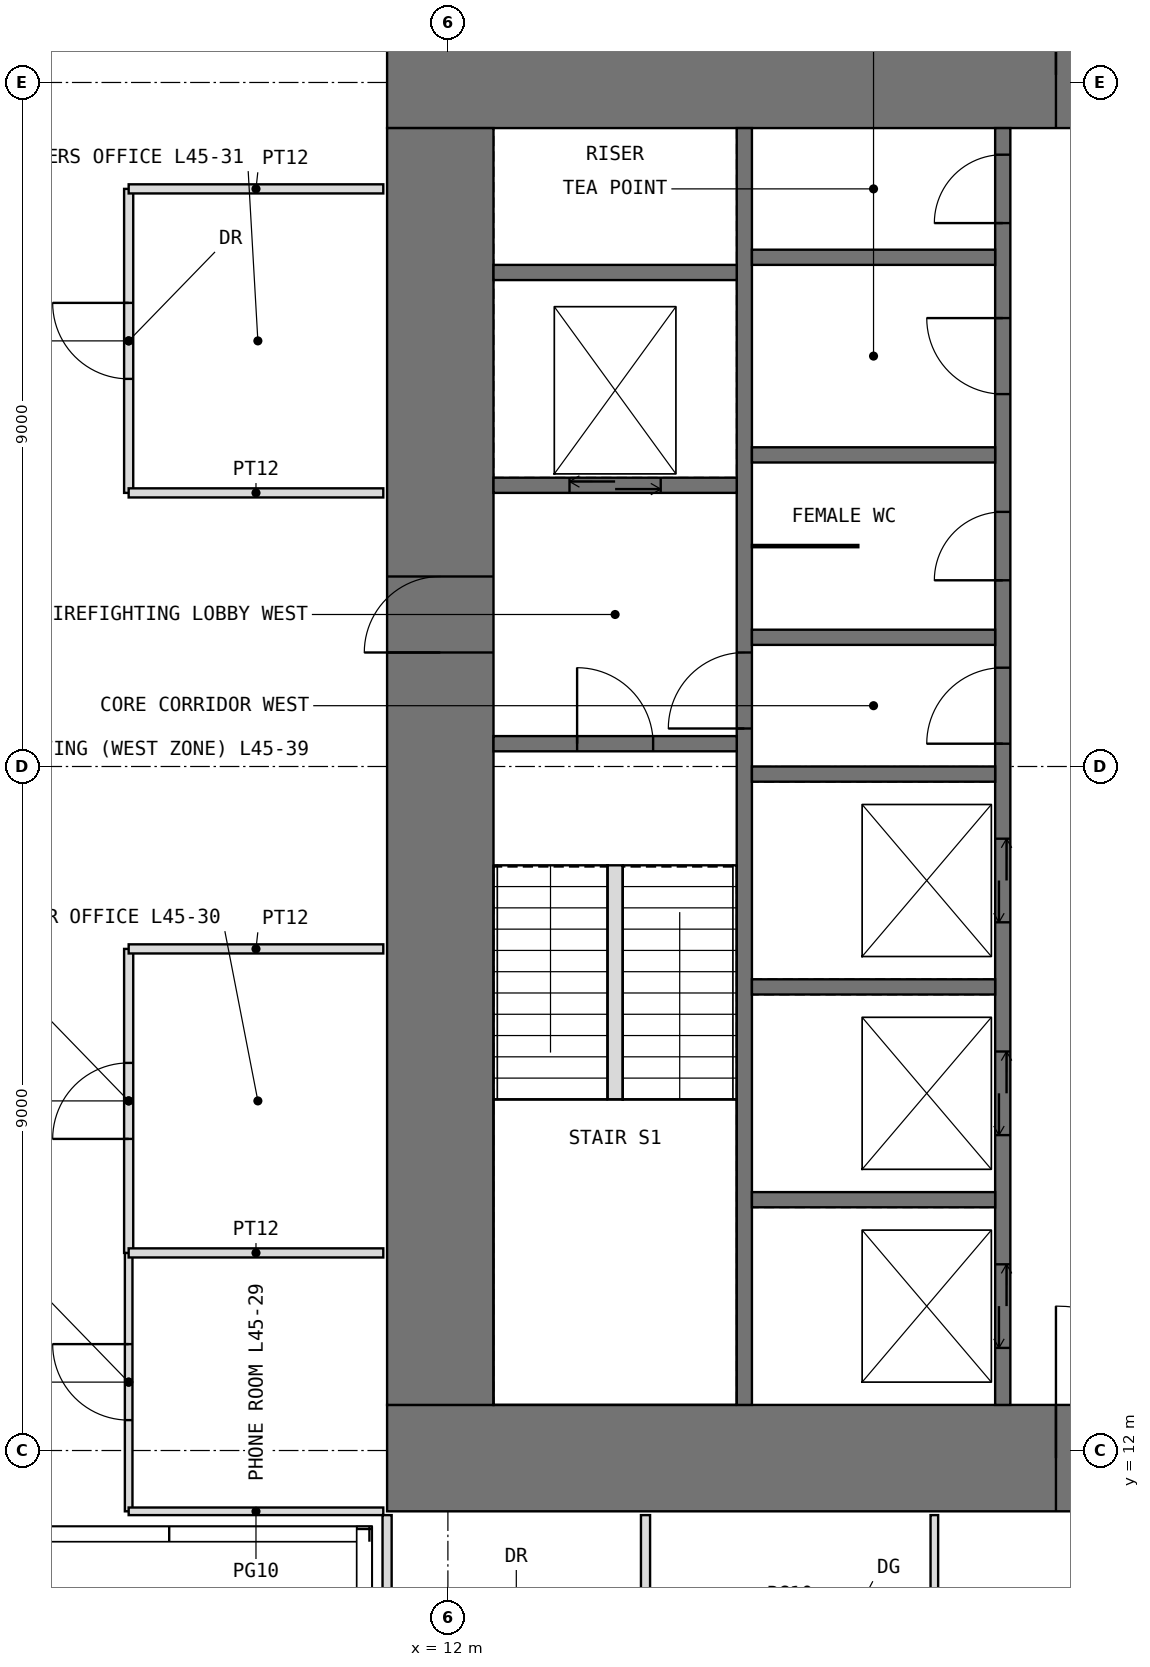
"""IFC4 building model, lengths in metres.
Left out: names, types, materials, properties, quantities, classifications, styles, units other than length and angle.
Written with IfcOpenShell. Run it as: python <this file> out.ifc"""

import sys

from ifc_helpers import new_model, si_unit, direction, frame, frame_2d, origin, place, context, subcontext, project, spatial, rectangle, extrude, element, fill, save


model = new_model("IFC4")
c1 = context("Model", 3, precision=1e-05, world=origin(), true_north=direction((0.0, 1.0)))
c2 = subcontext(c1, "Body", "Model", "MODEL_VIEW")
j1 = project(units=[si_unit("LENGTHUNIT", "METRE"), si_unit("PLANEANGLEUNIT", "RADIAN")], contexts=[c1])
p1 = place(None, origin())
s1 = spatial("IfcSite", under=j1, at=p1, CompositionType="ELEMENT")
p2 = place(p1, origin())
s2 = spatial("IfcBuilding", under=s1, at=p2, CompositionType="ELEMENT")
p3 = place(p2, frame((0.0, 0.0, 190.5)))
s3 = spatial("IfcBuildingStorey", under=s2, at=p3, CompositionType="ELEMENT", Elevation=190.5)
p4 = place(p3, frame((11.2, 11.9, -0.05), z_axis=(0.0, 0.0, 1.0), x_axis=(1.0, 0.0, 0.0)))
e1 = element("IfcWall", 1, at=p4, inside=s3, PredefinedType="SHEAR", context=c2, shape_type="SweptSolid", body=[
    extrude(rectangle(XDim=19.6, YDim=1.4, at=frame_2d((9.8, 0.0))), origin(), (0.0, 0.0, 1.0), 4.0),
])
p5 = place(p4, frame((8.8, 0.0, 0.05)))
e2 = element("IfcOpeningElement", 2, at=p5, cuts=e1, PredefinedType="OPENING", context=c2, shape_type="SweptSolid", body=[
    extrude(rectangle(XDim=2.0, YDim=2.2, at=frame_2d((1.0, 1.1))), frame((0.0, 0.71, 0.0), z_axis=(0.0, -1.0, 0.0), x_axis=(1.0, 0.0, 0.0)), (0.0, 0.0, 1.0), 1.42),
])
p6 = place(p3, frame((11.2, 30.1, -0.05), z_axis=(0.0, 0.0, 1.0), x_axis=(1.0, 0.0, 0.0)))
e3 = element("IfcWall", 3, at=p6, inside=s3, PredefinedType="SHEAR", context=c2, shape_type="SweptSolid", body=[
    extrude(rectangle(XDim=19.6, YDim=1.4, at=frame_2d((9.8, 0.0))), origin(), (0.0, 0.0, 1.0), 4.0),
])
p7 = place(p6, frame((8.8, 0.0, 0.05)))
e4 = element("IfcOpeningElement", 4, at=p7, cuts=e3, PredefinedType="OPENING", context=c2, shape_type="SweptSolid", body=[
    extrude(rectangle(XDim=2.0, YDim=2.2, at=frame_2d((1.0, 1.1))), frame((0.0, 0.71, 0.0), z_axis=(0.0, -1.0, 0.0), x_axis=(1.0, 0.0, 0.0)), (0.0, 0.0, 1.0), 1.42),
])
p8 = place(p3, frame((11.9, 12.6, -0.05), z_axis=(0.0, 0.0, 1.0), x_axis=(0.0, 1.0, 0.0)))
e5 = element("IfcWall", 5, at=p8, inside=s3, PredefinedType="SHEAR", context=c2, shape_type="SweptSolid", body=[
    extrude(rectangle(XDim=16.8, YDim=1.4, at=frame_2d((8.4, 0.0))), origin(), (0.0, 0.0, 1.0), 4.0),
])
p9 = place(p8, frame((9.9, 0.0, 0.05)))
e6 = element("IfcOpeningElement", 6, at=p9, cuts=e5, PredefinedType="OPENING", context=c2, shape_type="SweptSolid", body=[
    extrude(rectangle(XDim=1.0, YDim=2.2, at=frame_2d((0.5, 1.1))), frame((0.0, 0.71, 0.0), z_axis=(0.0, -1.0, 0.0), x_axis=(1.0, 0.0, 0.0)), (0.0, 0.0, 1.0), 1.42),
])
p10 = place(p3, frame((15.9, 12.6, -0.05), z_axis=(0.0, 0.0, 1.0), x_axis=(0.0, 1.0, 0.0)))
e7 = element("IfcWall", 7, at=p10, inside=s3, PredefinedType="SHEAR", context=c2, shape_type="SweptSolid", body=[
    extrude(rectangle(XDim=16.8, YDim=0.2, at=frame_2d((8.4, 0.0))), origin(), (0.0, 0.0, 1.0), 4.0),
])
p11 = place(p10, frame((8.9, 0.0, 0.05)))
e8 = element("IfcOpeningElement", 8, at=p11, cuts=e7, PredefinedType="OPENING", context=c2, shape_type="SweptSolid", body=[
    extrude(rectangle(XDim=1.0, YDim=2.2, at=frame_2d((0.5, 1.1))), frame((0.0, 0.11, 0.0), z_axis=(0.0, -1.0, 0.0), x_axis=(1.0, 0.0, 0.0)), (0.0, 0.0, 1.0), 0.22),
])
p12 = place(p3, frame((19.3, 12.6, -0.05), z_axis=(0.0, 0.0, 1.0), x_axis=(0.0, 1.0, 0.0)))
e9 = element("IfcWall", 9, at=p12, inside=s3, PredefinedType="SHEAR", context=c2, shape_type="SweptSolid", body=[
    extrude(rectangle(XDim=16.8, YDim=0.2, at=frame_2d((8.4, 0.0))), origin(), (0.0, 0.0, 1.0), 4.0),
])
p13 = place(p12, frame((8.7, 0.0, 0.05)))
e10 = element("IfcOpeningElement", 10, at=p13, cuts=e9, PredefinedType="OPENING", context=c2, shape_type="SweptSolid", body=[
    extrude(rectangle(XDim=1.0, YDim=2.2, at=frame_2d((0.5, 1.1))), frame((0.0, 0.11, 0.0), z_axis=(0.0, -1.0, 0.0), x_axis=(1.0, 0.0, 0.0)), (0.0, 0.0, 1.0), 0.22),
])
p14 = place(p12, frame((10.85, 0.0, 0.05)))
e11 = element("IfcOpeningElement", 11, at=p14, cuts=e9, PredefinedType="OPENING", context=c2, shape_type="SweptSolid", body=[
    extrude(rectangle(XDim=0.9, YDim=2.2, at=frame_2d((0.45, 1.1))), frame((0.0, 0.11, 0.0), z_axis=(0.0, -1.0, 0.0), x_axis=(1.0, 0.0, 0.0)), (0.0, 0.0, 1.0), 0.22),
])
p15 = place(p12, frame((13.3, 0.0, 0.05)))
e12 = element("IfcOpeningElement", 12, at=p15, cuts=e9, PredefinedType="OPENING", context=c2, shape_type="SweptSolid", body=[
    extrude(rectangle(XDim=1.0, YDim=2.2, at=frame_2d((0.5, 1.1))), frame((0.0, 0.11, 0.0), z_axis=(0.0, -1.0, 0.0), x_axis=(1.0, 0.0, 0.0)), (0.0, 0.0, 1.0), 0.22),
])
p16 = place(p12, frame((15.55, 0.0, 0.05)))
e13 = element("IfcOpeningElement", 13, at=p16, cuts=e9, PredefinedType="OPENING", context=c2, shape_type="SweptSolid", body=[
    extrude(rectangle(XDim=0.9, YDim=2.2, at=frame_2d((0.45, 1.1))), frame((0.0, 0.11, 0.0), z_axis=(0.0, -1.0, 0.0), x_axis=(1.0, 0.0, 0.0)), (0.0, 0.0, 1.0), 0.22),
])
p17 = place(p12, frame((0.75, 0.0, 0.05)))
e14 = element("IfcOpeningElement", 14, at=p17, cuts=e9, PredefinedType="OPENING", context=c2, shape_type="SweptSolid", body=[
    extrude(rectangle(XDim=1.1, YDim=2.2, at=frame_2d((0.55, 1.1))), frame((0.0, 0.11, 0.0), z_axis=(0.0, -1.0, 0.0), x_axis=(1.0, 0.0, 0.0)), (0.0, 0.0, 1.0), 0.22),
])
p18 = place(p12, frame((3.55, 0.0, 0.05)))
e15 = element("IfcOpeningElement", 15, at=p18, cuts=e9, PredefinedType="OPENING", context=c2, shape_type="SweptSolid", body=[
    extrude(rectangle(XDim=1.1, YDim=2.2, at=frame_2d((0.55, 1.1))), frame((0.0, 0.11, 0.0), z_axis=(0.0, -1.0, 0.0), x_axis=(1.0, 0.0, 0.0)), (0.0, 0.0, 1.0), 0.22),
])
p19 = place(p12, frame((6.35, 0.0, 0.05)))
e16 = element("IfcOpeningElement", 16, at=p19, cuts=e9, PredefinedType="OPENING", context=c2, shape_type="SweptSolid", body=[
    extrude(rectangle(XDim=1.1, YDim=2.2, at=frame_2d((0.55, 1.1))), frame((0.0, 0.11, 0.0), z_axis=(0.0, -1.0, 0.0), x_axis=(1.0, 0.0, 0.0)), (0.0, 0.0, 1.0), 0.22),
])
p20 = place(p3, frame((12.6, 21.3, -0.05), z_axis=(0.0, 0.0, 1.0), x_axis=(1.0, 0.0, 0.0)))
e17 = element("IfcWall", 17, at=p20, inside=s3, PredefinedType="SHEAR", context=c2, shape_type="SweptSolid", body=[
    extrude(rectangle(XDim=3.2, YDim=0.2, at=frame_2d((1.6, 0.0))), origin(), (0.0, 0.0, 1.0), 4.0),
])
p21 = place(p20, frame((1.1, 0.0, 0.05)))
e18 = element("IfcOpeningElement", 18, at=p21, cuts=e17, PredefinedType="OPENING", context=c2, shape_type="SweptSolid", body=[
    extrude(rectangle(XDim=1.0, YDim=2.2, at=frame_2d((0.5, 1.1))), frame((0.0, 0.11, 0.0), z_axis=(0.0, -1.0, 0.0), x_axis=(1.0, 0.0, 0.0)), (0.0, 0.0, 1.0), 0.22),
])
p22 = place(p3, frame((12.6, 24.7, -0.05), z_axis=(0.0, 0.0, 1.0), x_axis=(1.0, 0.0, 0.0)))
e19 = element("IfcWall", 19, at=p22, inside=s3, PredefinedType="SHEAR", context=c2, shape_type="SweptSolid", body=[
    extrude(rectangle(XDim=3.2, YDim=0.2, at=frame_2d((1.6, 0.0))), origin(), (0.0, 0.0, 1.0), 4.0),
])
p23 = place(p22, frame((1.0, 0.0, 0.05)))
e20 = element("IfcOpeningElement", 20, at=p23, cuts=e19, PredefinedType="OPENING", context=c2, shape_type="SweptSolid", body=[
    extrude(rectangle(XDim=1.2, YDim=2.2, at=frame_2d((0.6, 1.1))), frame((0.0, 0.11, 0.0), z_axis=(0.0, -1.0, 0.0), x_axis=(1.0, 0.0, 0.0)), (0.0, 0.0, 1.0), 0.22),
])
for number, where, z_axis, x_axis in (
    (21, (12.6, 27.5, -0.05), (0.0, 0.0, 1.0), (1.0, 0.0, 0.0)),
    (22, (16.0, 15.3, -0.05), (0.0, 0.0, 1.0), (1.0, 0.0, 0.0)),
    (23, (16.0, 18.1, -0.05), (0.0, 0.0, 1.0), (1.0, 0.0, 0.0)),
    (24, (16.0, 20.9, -0.05), (0.0, 0.0, 1.0), (1.0, 0.0, 0.0)),
    (25, (16.0, 22.7, -0.05), (0.0, 0.0, 1.0), (1.0, 0.0, 0.0)),
    (26, (16.0, 25.1, -0.05), (0.0, 0.0, 1.0), (1.0, 0.0, 0.0)),
    (27, (16.0, 27.7, -0.05), (0.0, 0.0, 1.0), (1.0, 0.0, 0.0)),
):
    element("IfcWall", number, at=place(p3, frame(where, z_axis=z_axis, x_axis=x_axis)), inside=s3, PredefinedType="SHEAR", context=c2, shape_type="SweptSolid", body=[
        extrude(rectangle(XDim=3.2, YDim=0.2, at=frame_2d((1.6, 0.0))), origin(), (0.0, 0.0, 1.0), 4.0),
    ])
p24 = place(p3, frame((16.0, 23.9, 0.0), z_axis=(0.0, 0.0, 1.0), x_axis=(1.0, 0.0, 0.0)))
e28 = element("IfcWall", 28, at=p24, inside=s3, PredefinedType="PARTITIONING", context=c2, shape_type="SweptSolid", body=[
    extrude(rectangle(XDim=1.4, YDim=0.03, at=frame_2d((0.7, 0.0))), origin(), (0.0, 0.0, 1.0), 3.75),
])
p25 = place(p3, frame((7.8, 11.2, 0.0), z_axis=(0.0, 0.0, 1.0), x_axis=(0.0, 1.0, 0.0)))
e29 = element("IfcWall", 29, at=p25, inside=s3, PredefinedType="PARTITIONING", context=c2, shape_type="SweptSolid", body=[
    extrude(rectangle(XDim=3.4, YDim=0.1, at=frame_2d((1.7, 0.0))), origin(), (0.0, 0.0, 1.0), 3.75),
])
p26 = place(p25, frame((1.2, 0.0, 0.0)))
e30 = element("IfcOpeningElement", 30, at=p26, cuts=e29, PredefinedType="OPENING", context=c2, shape_type="SweptSolid", body=[
    extrude(rectangle(XDim=1.0, YDim=2.4, at=frame_2d((0.5, 1.2))), frame((0.0, 0.06, 0.0), z_axis=(0.0, -1.0, 0.0), x_axis=(1.0, 0.0, 0.0)), (0.0, 0.0, 1.0), 0.12),
])
p27 = place(p3, frame((7.8, 11.2, 0.0), z_axis=(0.0, 0.0, 1.0), x_axis=(1.0, 0.0, 0.0)))
e31 = element("IfcWall", 31, at=p27, inside=s3, PredefinedType="PARTITIONING", context=c2, shape_type="SweptSolid", body=[
    extrude(rectangle(XDim=3.35, YDim=0.1, at=frame_2d((1.675, 0.0))), origin(), (0.0, 0.0, 1.0), 3.75),
])
p28 = place(p3, frame((7.8, 14.6, 0.0), z_axis=(0.0, 0.0, 1.0), x_axis=(0.0, 1.0, 0.0)))
e32 = element("IfcWall", 32, at=p28, inside=s3, PredefinedType="PARTITIONING", context=c2, shape_type="SweptSolid", body=[
    extrude(rectangle(XDim=4.0, YDim=0.12, at=frame_2d((2.0, 0.0))), origin(), (0.0, 0.0, 1.0), 3.75),
])
p29 = place(p28, frame((1.5, 0.0, 0.0)))
e33 = element("IfcOpeningElement", 33, at=p29, cuts=e32, PredefinedType="OPENING", context=c2, shape_type="SweptSolid", body=[
    extrude(rectangle(XDim=1.0, YDim=2.2, at=frame_2d((0.5, 1.1))), frame((0.0, 0.07, 0.0), z_axis=(0.0, -1.0, 0.0), x_axis=(1.0, 0.0, 0.0)), (0.0, 0.0, 1.0), 0.14),
])
for number, where, z_axis, x_axis in (
    (34, (7.8, 14.6, 0.0), (0.0, 0.0, 1.0), (1.0, 0.0, 0.0)),
    (35, (7.8, 18.6, 0.0), (0.0, 0.0, 1.0), (1.0, 0.0, 0.0)),
):
    element("IfcWall", number, at=place(p3, frame(where, z_axis=z_axis, x_axis=x_axis)), inside=s3, PredefinedType="PARTITIONING", context=c2, shape_type="SweptSolid", body=[
        extrude(rectangle(XDim=3.35, YDim=0.12, at=frame_2d((1.675, 0.0))), origin(), (0.0, 0.0, 1.0), 3.75),
    ])
p30 = place(p3, frame((7.8, 24.6, 0.0), z_axis=(0.0, 0.0, 1.0), x_axis=(0.0, 1.0, 0.0)))
e36 = element("IfcWall", 36, at=p30, inside=s3, PredefinedType="PARTITIONING", context=c2, shape_type="SweptSolid", body=[
    extrude(rectangle(XDim=4.0, YDim=0.12, at=frame_2d((2.0, 0.0))), origin(), (0.0, 0.0, 1.0), 3.75),
])
p31 = place(p30, frame((1.5, 0.0, 0.0)))
e37 = element("IfcOpeningElement", 37, at=p31, cuts=e36, PredefinedType="OPENING", context=c2, shape_type="SweptSolid", body=[
    extrude(rectangle(XDim=1.0, YDim=2.2, at=frame_2d((0.5, 1.1))), frame((0.0, 0.07, 0.0), z_axis=(0.0, -1.0, 0.0), x_axis=(1.0, 0.0, 0.0)), (0.0, 0.0, 1.0), 0.14),
])
for number, where, z_axis, x_axis in (
    (38, (7.8, 24.6, 0.0), (0.0, 0.0, 1.0), (1.0, 0.0, 0.0)),
    (39, (7.8, 28.6, 0.0), (0.0, 0.0, 1.0), (1.0, 0.0, 0.0)),
):
    element("IfcWall", number, at=place(p3, frame(where, z_axis=z_axis, x_axis=x_axis)), inside=s3, PredefinedType="PARTITIONING", context=c2, shape_type="SweptSolid", body=[
        extrude(rectangle(XDim=3.35, YDim=0.12, at=frame_2d((1.675, 0.0))), origin(), (0.0, 0.0, 1.0), 3.75),
    ])
for number, where, z_axis, x_axis in (
    (40, (11.2, 8.7, 0.0), (0.0, 0.0, 1.0), (0.0, 1.0, 0.0)),
    (41, (14.6, 8.7, 0.0), (0.0, 0.0, 1.0), (0.0, 1.0, 0.0)),
):
    element("IfcWall", number, at=place(p3, frame(where, z_axis=z_axis, x_axis=x_axis)), inside=s3, PredefinedType="PARTITIONING", context=c2, shape_type="SweptSolid", body=[
        extrude(rectangle(XDim=2.45, YDim=0.12, at=frame_2d((1.225, 0.0))), origin(), (0.0, 0.0, 1.0), 3.75),
    ])
p32 = place(p3, frame((18.4, 8.2, 0.0), z_axis=(0.0, 0.0, 1.0), x_axis=(0.0, 1.0, 0.0)))
e42 = element("IfcWall", 42, at=p32, inside=s3, PredefinedType="PARTITIONING", context=c2, shape_type="SweptSolid", body=[
    extrude(rectangle(XDim=2.95, YDim=0.1, at=frame_2d((1.475, 0.0))), origin(), (0.0, 0.0, 1.0), 3.75),
])
p33 = place(p3, frame((14.2, 16.62, 0.0), z_axis=(0.0, 0.0, 1.0), x_axis=(0.0, 1.0, 0.0)))
e43 = element("IfcWall", 43, at=p33, inside=s3, PredefinedType="PARTITIONING", context=c2, shape_type="SweptSolid", body=[
    extrude(rectangle(XDim=3.08, YDim=0.2, at=frame_2d((1.54, 0.0))), origin(), (0.0, 0.0, 1.0), 4.0),
])
p34 = place(p5, origin())
e44 = element("IfcDoor", 44, at=p34, inside=s3, OperationType="DOUBLE_DOOR_SINGLE_SWING", PredefinedType="DOOR", context=c2, shape_type="SweptSolid", body=[
    extrude(rectangle(XDim=2.0, YDim=2.2, at=frame_2d((1.0, 1.1))), frame((0.0, 0.025, 0.0), z_axis=(0.0, -1.0, 0.0), x_axis=(1.0, 0.0, 0.0)), (0.0, 0.0, 1.0), 0.05),
])
fill(e2, e44)
p35 = place(p7, origin())
e45 = element("IfcDoor", 45, at=p35, inside=s3, OperationType="DOUBLE_DOOR_SINGLE_SWING", PredefinedType="DOOR", context=c2, shape_type="SweptSolid", body=[
    extrude(rectangle(XDim=2.0, YDim=2.2, at=frame_2d((1.0, 1.1))), frame((0.0, 0.025, 0.0), z_axis=(0.0, -1.0, 0.0), x_axis=(1.0, 0.0, 0.0)), (0.0, 0.0, 1.0), 0.05),
])
fill(e4, e45)
p36 = place(p9, origin())
e46 = element("IfcDoor", 46, at=p36, inside=s3, OperationType="SINGLE_SWING_LEFT", PredefinedType="DOOR", context=c2, shape_type="SweptSolid", body=[
    extrude(rectangle(XDim=1.0, YDim=2.2, at=frame_2d((0.5, 1.1))), frame((0.0, 0.025, 0.0), z_axis=(0.0, -1.0, 0.0), x_axis=(1.0, 0.0, 0.0)), (0.0, 0.0, 1.0), 0.05),
])
fill(e6, e46)
p37 = place(p21, origin())
e47 = element("IfcDoor", 47, at=p37, inside=s3, OperationType="SINGLE_SWING_LEFT", PredefinedType="DOOR", context=c2, shape_type="SweptSolid", body=[
    extrude(rectangle(XDim=1.0, YDim=2.2, at=frame_2d((0.5, 1.1))), frame((0.0, 0.025, 0.0), z_axis=(0.0, -1.0, 0.0), x_axis=(1.0, 0.0, 0.0)), (0.0, 0.0, 1.0), 0.05),
])
fill(e18, e47)
p38 = place(p11, origin())
e48 = element("IfcDoor", 48, at=p38, inside=s3, OperationType="SINGLE_SWING_LEFT", PredefinedType="DOOR", context=c2, shape_type="SweptSolid", body=[
    extrude(rectangle(XDim=1.0, YDim=2.2, at=frame_2d((0.5, 1.1))), frame((0.0, 0.025, 0.0), z_axis=(0.0, -1.0, 0.0), x_axis=(1.0, 0.0, 0.0)), (0.0, 0.0, 1.0), 0.05),
])
fill(e8, e48)
p39 = place(p13, origin())
e49 = element("IfcDoor", 49, at=p39, inside=s3, OperationType="SINGLE_SWING_LEFT", PredefinedType="DOOR", context=c2, shape_type="SweptSolid", body=[
    extrude(rectangle(XDim=1.0, YDim=2.2, at=frame_2d((0.5, 1.1))), frame((0.0, 0.025, 0.0), z_axis=(0.0, -1.0, 0.0), x_axis=(1.0, 0.0, 0.0)), (0.0, 0.0, 1.0), 0.05),
])
fill(e10, e49)
p40 = place(p14, origin())
e50 = element("IfcDoor", 50, at=p40, inside=s3, OperationType="SINGLE_SWING_LEFT", PredefinedType="DOOR", context=c2, shape_type="SweptSolid", body=[
    extrude(rectangle(XDim=0.9, YDim=2.2, at=frame_2d((0.45, 1.1))), frame((0.0, 0.025, 0.0), z_axis=(0.0, -1.0, 0.0), x_axis=(1.0, 0.0, 0.0)), (0.0, 0.0, 1.0), 0.05),
])
fill(e11, e50)
p41 = place(p15, origin())
e51 = element("IfcDoor", 51, at=p41, inside=s3, OperationType="SINGLE_SWING_RIGHT", PredefinedType="DOOR", context=c2, shape_type="SweptSolid", body=[
    extrude(rectangle(XDim=1.0, YDim=2.2, at=frame_2d((0.5, 1.1))), frame((0.0, 0.025, 0.0), z_axis=(0.0, -1.0, 0.0), x_axis=(1.0, 0.0, 0.0)), (0.0, 0.0, 1.0), 0.05),
])
fill(e12, e51)
p42 = place(p16, origin())
e52 = element("IfcDoor", 52, at=p42, inside=s3, OperationType="SINGLE_SWING_LEFT", PredefinedType="DOOR", context=c2, shape_type="SweptSolid", body=[
    extrude(rectangle(XDim=0.9, YDim=2.2, at=frame_2d((0.45, 1.1))), frame((0.0, 0.025, 0.0), z_axis=(0.0, -1.0, 0.0), x_axis=(1.0, 0.0, 0.0)), (0.0, 0.0, 1.0), 0.05),
])
fill(e13, e52)
p43 = place(p26, origin())
e53 = element("IfcDoor", 53, at=p43, inside=s3, OperationType="SINGLE_SWING_RIGHT", PredefinedType="DOOR", context=c2, shape_type="SweptSolid", body=[
    extrude(rectangle(XDim=1.0, YDim=2.4, at=frame_2d((0.5, 1.2))), frame((0.0, 0.025, 0.0), z_axis=(0.0, -1.0, 0.0), x_axis=(1.0, 0.0, 0.0)), (0.0, 0.0, 1.0), 0.05),
])
fill(e30, e53)
p44 = place(p29, origin())
e54 = element("IfcDoor", 54, at=p44, inside=s3, OperationType="SINGLE_SWING_LEFT", PredefinedType="DOOR", context=c2, shape_type="SweptSolid", body=[
    extrude(rectangle(XDim=1.0, YDim=2.2, at=frame_2d((0.5, 1.1))), frame((0.0, 0.025, 0.0), z_axis=(0.0, -1.0, 0.0), x_axis=(1.0, 0.0, 0.0)), (0.0, 0.0, 1.0), 0.05),
])
fill(e33, e54)
p45 = place(p31, origin())
e55 = element("IfcDoor", 55, at=p45, inside=s3, OperationType="SINGLE_SWING_RIGHT", PredefinedType="DOOR", context=c2, shape_type="SweptSolid", body=[
    extrude(rectangle(XDim=1.0, YDim=2.2, at=frame_2d((0.5, 1.1))), frame((0.0, 0.025, 0.0), z_axis=(0.0, -1.0, 0.0), x_axis=(1.0, 0.0, 0.0)), (0.0, 0.0, 1.0), 0.05),
])
fill(e37, e55)
p46 = place(p17, origin())
e56 = element("IfcDoor", 56, at=p46, inside=s3, OperationType="DOUBLE_DOOR_SLIDING", PredefinedType="DOOR", context=c2, shape_type="SweptSolid", body=[
    extrude(rectangle(XDim=1.1, YDim=2.2, at=frame_2d((0.55, 1.1))), frame((0.0, 0.025, 0.0), z_axis=(0.0, -1.0, 0.0), x_axis=(1.0, 0.0, 0.0)), (0.0, 0.0, 1.0), 0.05),
])
fill(e14, e56)
p47 = place(p18, origin())
e57 = element("IfcDoor", 57, at=p47, inside=s3, OperationType="DOUBLE_DOOR_SLIDING", PredefinedType="DOOR", context=c2, shape_type="SweptSolid", body=[
    extrude(rectangle(XDim=1.1, YDim=2.2, at=frame_2d((0.55, 1.1))), frame((0.0, 0.025, 0.0), z_axis=(0.0, -1.0, 0.0), x_axis=(1.0, 0.0, 0.0)), (0.0, 0.0, 1.0), 0.05),
])
fill(e15, e57)
p48 = place(p19, origin())
e58 = element("IfcDoor", 58, at=p48, inside=s3, OperationType="DOUBLE_DOOR_SLIDING", PredefinedType="DOOR", context=c2, shape_type="SweptSolid", body=[
    extrude(rectangle(XDim=1.1, YDim=2.2, at=frame_2d((0.55, 1.1))), frame((0.0, 0.025, 0.0), z_axis=(0.0, -1.0, 0.0), x_axis=(1.0, 0.0, 0.0)), (0.0, 0.0, 1.0), 0.05),
])
fill(e16, e58)
p49 = place(p23, origin())
e59 = element("IfcDoor", 59, at=p49, inside=s3, OperationType="DOUBLE_DOOR_SLIDING", PredefinedType="DOOR", context=c2, shape_type="SweptSolid", body=[
    extrude(rectangle(XDim=1.2, YDim=2.2, at=frame_2d((0.6, 1.1))), frame((0.0, 0.025, 0.0), z_axis=(0.0, -1.0, 0.0), x_axis=(1.0, 0.0, 0.0)), (0.0, 0.0, 1.0), 0.05),
])
fill(e20, e59)
save(model, sys.argv[1])
